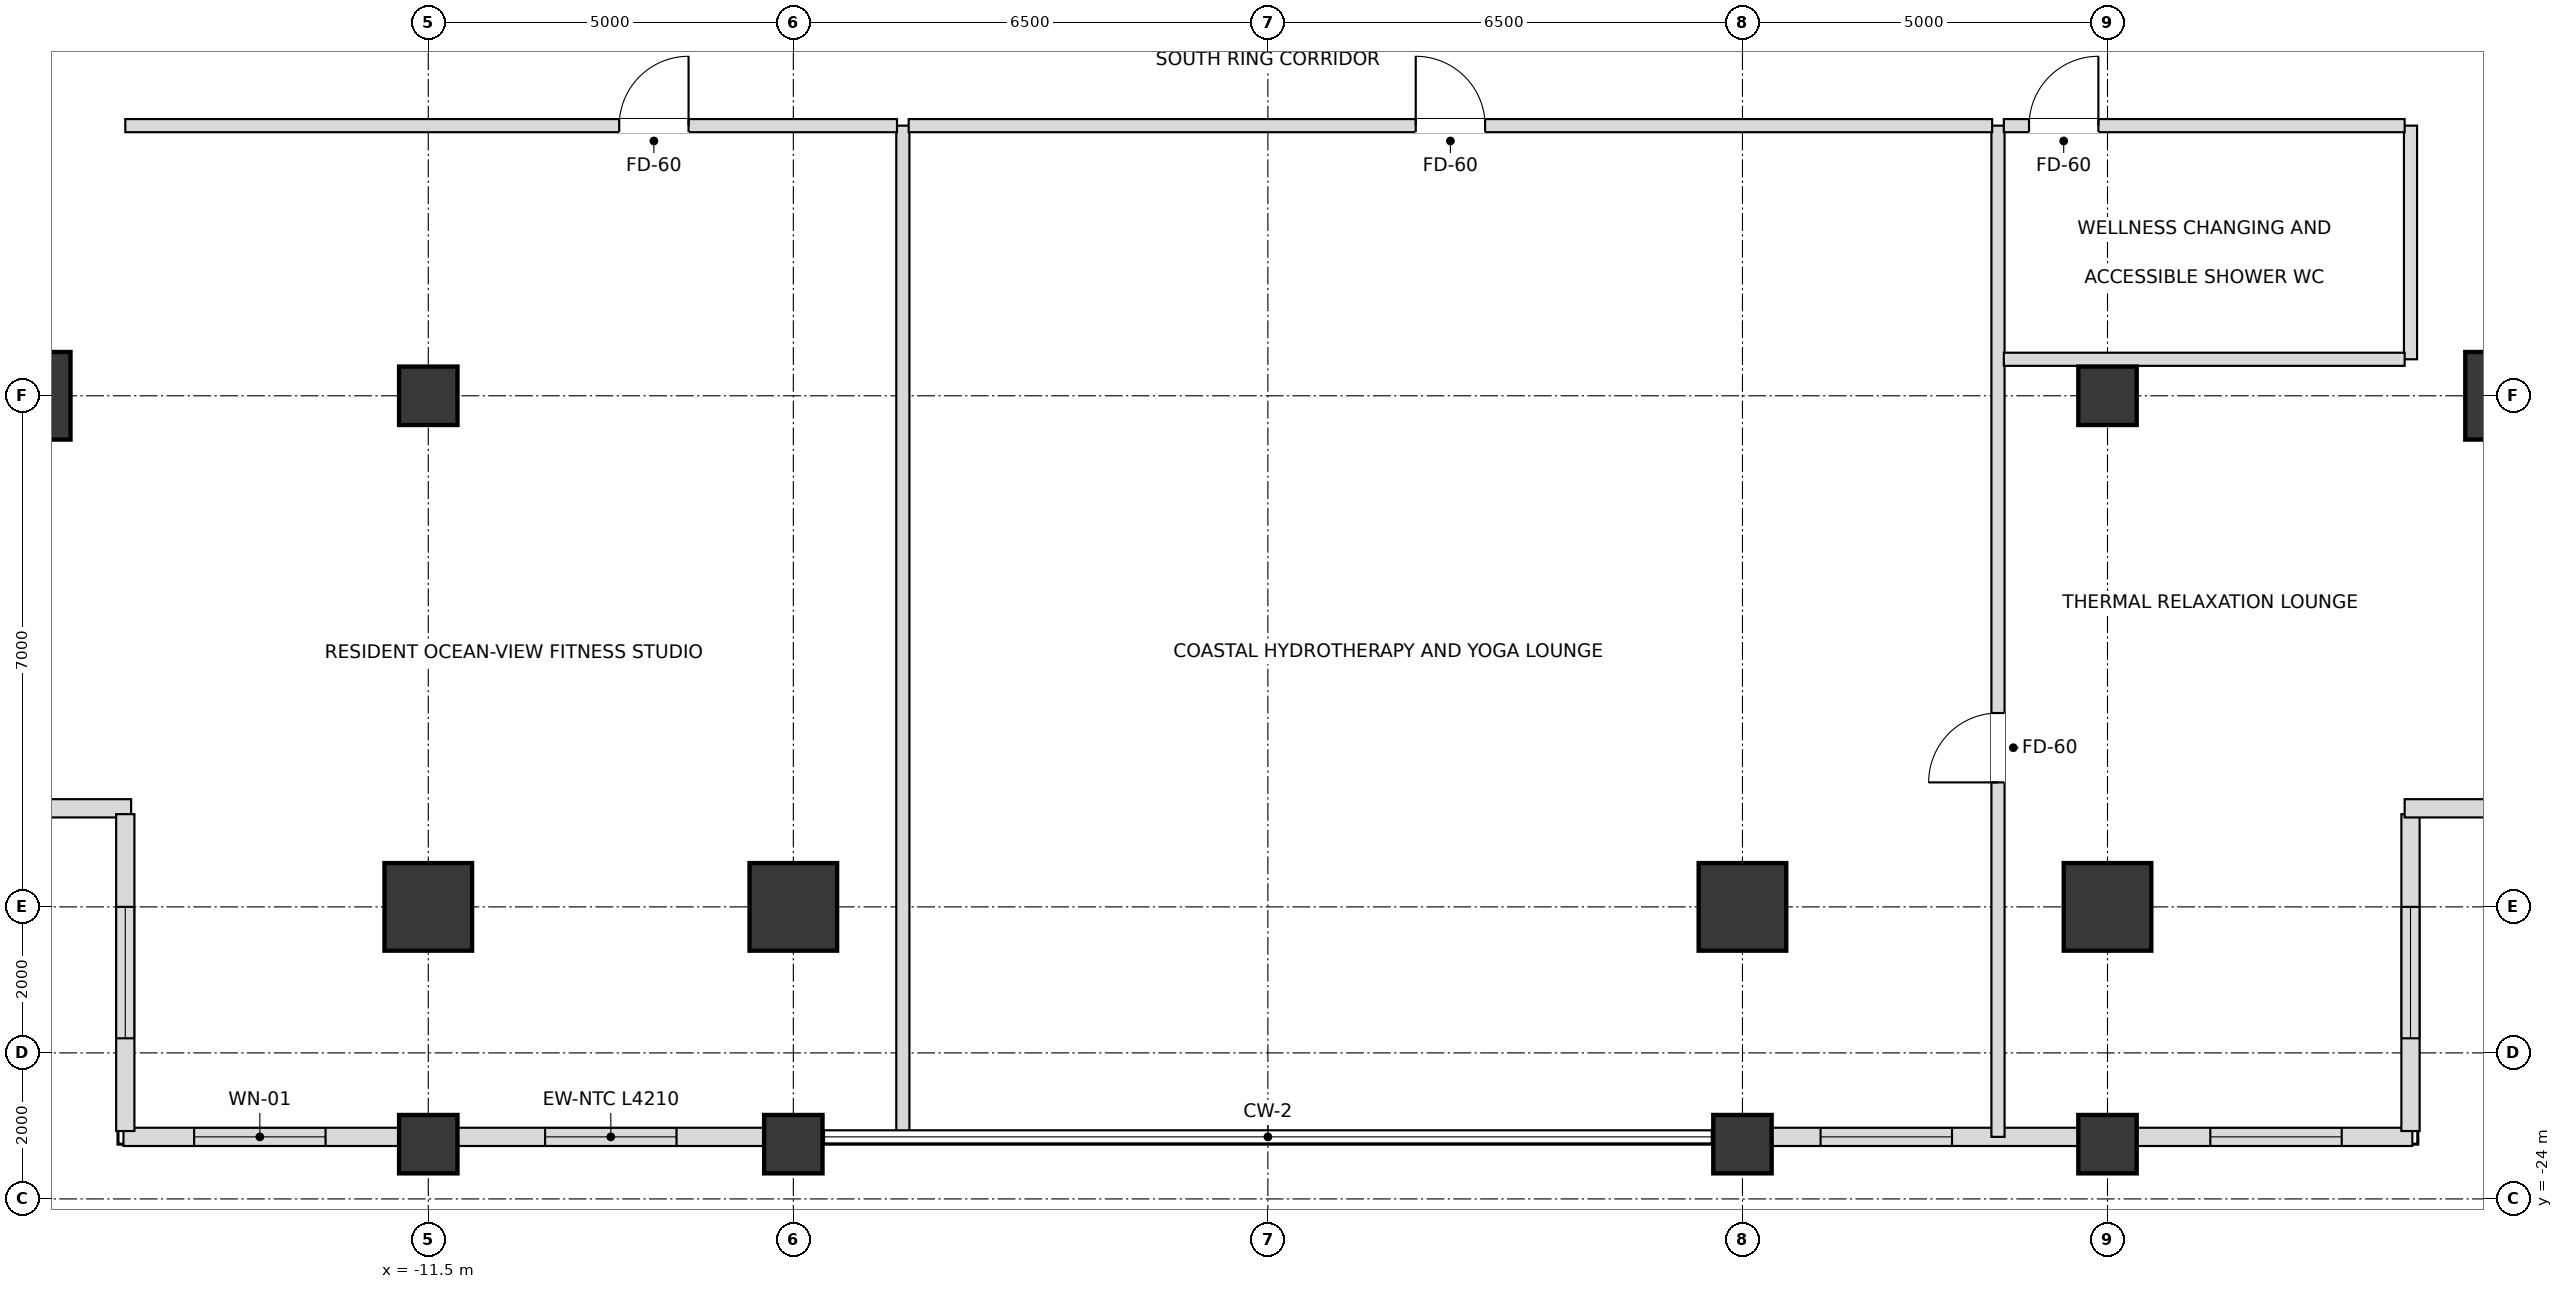
"""IFC4 building model, lengths in metres.
Left out: names, types, materials, properties, quantities, classifications, styles, units other than length and angle.
Written with IfcOpenShell. Run it as: python <this file> out.ifc"""

import sys

from ifc_helpers import new_model, si_unit, direction, frame, frame_2d, origin, origin_2d, place, context, subcontext, project, spatial, rectangle, extrude, element, fill, save


model = new_model("IFC4")
c1 = context("Model", 3, precision=1e-05, world=origin(), true_north=direction((0.0, 1.0)))
c2 = subcontext(c1, "Body", "Model", "MODEL_VIEW")
j1 = project(units=[si_unit("LENGTHUNIT", "METRE"), si_unit("PLANEANGLEUNIT", "RADIAN")], contexts=[c1])
p1 = place(None, origin())
s1 = spatial("IfcSite", under=j1, at=p1, CompositionType="ELEMENT")
p2 = place(p1, origin())
s2 = spatial("IfcBuilding", under=s1, at=p2, CompositionType="ELEMENT")
p3 = place(p2, frame((0.0, 0.0, 106.2)))
s3 = spatial("IfcBuildingStorey", under=s2, at=p3, CompositionType="ELEMENT", Elevation=106.2)
for number, where, z_axis, x_axis in (
    (1, (-11.5, -20.0, 0.0), (0.0, 0.0, 1.0), (1.0, 0.0, 0.0)),
    (2, (-6.5, -20.0, 0.0), (0.0, 0.0, 1.0), (1.0, 0.0, 0.0)),
    (3, (6.5, -20.0, 0.0), (0.0, 0.0, 1.0), (1.0, 0.0, 0.0)),
    (4, (11.5, -20.0, 0.0), (0.0, 0.0, 1.0), (1.0, 0.0, 0.0)),
    (5, (17.0, -13.0, 0.0), (0.0, 0.0, 1.0), (1.0, 0.0, 0.0)),
    (6, (-17.0, -13.0, 0.0), (0.0, 0.0, 1.0), (1.0, 0.0, 0.0)),
):
    element("IfcColumn", number, at=place(p3, frame(where, z_axis=z_axis, x_axis=x_axis)), inside=s3, PredefinedType="USERDEFINED", context=c2, shape_type="SweptSolid", body=[
        extrude(rectangle(XDim=1.2, YDim=1.2, at=origin_2d()), origin(), (0.0, 0.0, 1.0), 3.6),
    ])
for number, where, z_axis, x_axis in (
    (7, (-11.5, -13.0, 0.0), (0.0, 0.0, 1.0), (1.0, 0.0, 0.0)),
    (8, (11.5, -13.0, 0.0), (0.0, 0.0, 1.0), (1.0, 0.0, 0.0)),
    (9, (-11.5, -23.25, 0.0), (0.0, 0.0, 1.0), (1.0, 0.0, 0.0)),
    (10, (-6.5, -23.25, 0.0), (0.0, 0.0, 1.0), (1.0, 0.0, 0.0)),
    (11, (6.5, -23.25, 0.0), (0.0, 0.0, 1.0), (1.0, 0.0, 0.0)),
    (12, (11.5, -23.25, 0.0), (0.0, 0.0, 1.0), (1.0, 0.0, 0.0)),
):
    element("IfcColumn", number, at=place(p3, frame(where, z_axis=z_axis, x_axis=x_axis)), inside=s3, PredefinedType="COLUMN", context=c2, shape_type="SweptSolid", body=[
        extrude(rectangle(XDim=0.8, YDim=0.8, at=origin_2d()), origin(), (0.0, 0.0, 1.0), 3.6),
    ])
p4 = place(p3, frame((-15.675, -23.15, 0.0), z_axis=(0.0, 0.0, 1.0), x_axis=(1.0, 0.0, 0.0)))
e13 = element("IfcWall", 13, at=p4, inside=s3, PredefinedType="SOLIDWALL", context=c2, shape_type="SweptSolid", body=[
    extrude(rectangle(XDim=3.78, YDim=0.25, at=frame_2d((1.89, 0.0))), origin(), (0.0, 0.0, 1.0), 2.736),
])
p5 = place(p4, frame((0.968, 0.0, 0.72)))
e14 = element("IfcOpeningElement", 14, at=p5, cuts=e13, PredefinedType="OPENING", context=c2, shape_type="SweptSolid", body=[
    extrude(rectangle(XDim=1.8, YDim=1.68, at=frame_2d((0.9, 0.84))), frame((0.0, 0.135, 0.0), z_axis=(0.0, -1.0, 0.0), x_axis=(1.0, 0.0, 0.0)), (0.0, 0.0, 1.0), 0.27),
])
p6 = place(p3, frame((-11.105, -23.15, 0.0), z_axis=(0.0, 0.0, 1.0), x_axis=(1.0, 0.0, 0.0)))
e15 = element("IfcWall", 15, at=p6, inside=s3, PredefinedType="SOLIDWALL", context=c2, shape_type="SweptSolid", body=[
    extrude(rectangle(XDim=4.21, YDim=0.25, at=frame_2d((2.105, 0.0))), origin(), (0.0, 0.0, 1.0), 2.736),
])
p7 = place(p6, frame((1.205, 0.0, 0.72)))
e16 = element("IfcOpeningElement", 16, at=p7, cuts=e15, PredefinedType="OPENING", context=c2, shape_type="SweptSolid", body=[
    extrude(rectangle(XDim=1.8, YDim=1.68, at=frame_2d((0.9, 0.84))), frame((0.0, 0.135, 0.0), z_axis=(0.0, -1.0, 0.0), x_axis=(1.0, 0.0, 0.0)), (0.0, 0.0, 1.0), 0.27),
])
p8 = place(p3, frame((6.895, -23.15, 0.0), z_axis=(0.0, 0.0, 1.0), x_axis=(1.0, 0.0, 0.0)))
e17 = element("IfcWall", 17, at=p8, inside=s3, PredefinedType="SOLIDWALL", context=c2, shape_type="SweptSolid", body=[
    extrude(rectangle(XDim=4.21, YDim=0.25, at=frame_2d((2.105, 0.0))), origin(), (0.0, 0.0, 1.0), 2.736),
])
p9 = place(p8, frame((0.675, 0.0, 0.72)))
e18 = element("IfcOpeningElement", 18, at=p9, cuts=e17, PredefinedType="OPENING", context=c2, shape_type="SweptSolid", body=[
    extrude(rectangle(XDim=1.8, YDim=1.68, at=frame_2d((0.9, 0.84))), frame((0.0, 0.135, 0.0), z_axis=(0.0, -1.0, 0.0), x_axis=(1.0, 0.0, 0.0)), (0.0, 0.0, 1.0), 0.27),
])
p10 = place(p3, frame((11.895, -23.15, 0.0), z_axis=(0.0, 0.0, 1.0), x_axis=(1.0, 0.0, 0.0)))
e19 = element("IfcWall", 19, at=p10, inside=s3, PredefinedType="SOLIDWALL", context=c2, shape_type="SweptSolid", body=[
    extrude(rectangle(XDim=3.78, YDim=0.25, at=frame_2d((1.89, 0.0))), origin(), (0.0, 0.0, 1.0), 2.736),
])
p11 = place(p10, frame((1.013, 0.0, 0.72)))
e20 = element("IfcOpeningElement", 20, at=p11, cuts=e19, PredefinedType="OPENING", context=c2, shape_type="SweptSolid", body=[
    extrude(rectangle(XDim=1.8, YDim=1.68, at=frame_2d((0.9, 0.84))), frame((0.0, 0.135, 0.0), z_axis=(0.0, -1.0, 0.0), x_axis=(1.0, 0.0, 0.0)), (0.0, 0.0, 1.0), 0.27),
])
p12 = place(p3, frame((-20.23, -18.65, 0.0), z_axis=(0.0, 0.0, 1.0), x_axis=(1.0, 0.0, 0.0)))
e21 = element("IfcWall", 21, at=p12, inside=s3, PredefinedType="SOLIDWALL", context=c2, shape_type="SweptSolid", body=[
    extrude(rectangle(XDim=4.66, YDim=0.25, at=frame_2d((2.33, 0.0))), origin(), (0.0, 0.0, 1.0), 2.736),
])
p13 = place(p12, frame((1.43, 0.0, 0.72)))
e22 = element("IfcOpeningElement", 22, at=p13, cuts=e21, PredefinedType="OPENING", context=c2, shape_type="SweptSolid", body=[
    extrude(rectangle(XDim=1.8, YDim=1.68, at=frame_2d((0.9, 0.84))), frame((0.0, 0.135, 0.0), z_axis=(0.0, -1.0, 0.0), x_axis=(1.0, 0.0, 0.0)), (0.0, 0.0, 1.0), 0.27),
])
p14 = place(p3, frame((-15.65, -18.73, 0.0), z_axis=(0.0, 0.0, 1.0), x_axis=(0.0, -1.0, 0.0)))
e23 = element("IfcWall", 23, at=p14, inside=s3, PredefinedType="SOLIDWALL", context=c2, shape_type="SweptSolid", body=[
    extrude(rectangle(XDim=4.34, YDim=0.25, at=frame_2d((2.17, 0.0))), origin(), (0.0, 0.0, 1.0), 2.736),
])
p15 = place(p14, frame((1.27, 0.0, 0.72)))
e24 = element("IfcOpeningElement", 24, at=p15, cuts=e23, PredefinedType="OPENING", context=c2, shape_type="SweptSolid", body=[
    extrude(rectangle(XDim=1.8, YDim=1.68, at=frame_2d((0.9, 0.84))), frame((0.0, 0.135, 0.0), z_axis=(0.0, -1.0, 0.0), x_axis=(1.0, 0.0, 0.0)), (0.0, 0.0, 1.0), 0.27),
])
p16 = place(p3, frame((15.65, -23.07, 0.0), z_axis=(0.0, 0.0, 1.0), x_axis=(0.0, 1.0, 0.0)))
e25 = element("IfcWall", 25, at=p16, inside=s3, PredefinedType="SOLIDWALL", context=c2, shape_type="SweptSolid", body=[
    extrude(rectangle(XDim=4.34, YDim=0.25, at=frame_2d((2.17, 0.0))), origin(), (0.0, 0.0, 1.0), 2.736),
])
p17 = place(p16, frame((1.27, 0.0, 0.72)))
e26 = element("IfcOpeningElement", 26, at=p17, cuts=e25, PredefinedType="OPENING", context=c2, shape_type="SweptSolid", body=[
    extrude(rectangle(XDim=1.8, YDim=1.68, at=frame_2d((0.9, 0.84))), frame((0.0, 0.135, 0.0), z_axis=(0.0, -1.0, 0.0), x_axis=(1.0, 0.0, 0.0)), (0.0, 0.0, 1.0), 0.27),
])
p18 = place(p3, frame((15.57, -18.65, 0.0), z_axis=(0.0, 0.0, 1.0), x_axis=(1.0, 0.0, 0.0)))
e27 = element("IfcWall", 27, at=p18, inside=s3, PredefinedType="SOLIDWALL", context=c2, shape_type="SweptSolid", body=[
    extrude(rectangle(XDim=4.66, YDim=0.25, at=frame_2d((2.33, 0.0))), origin(), (0.0, 0.0, 1.0), 2.736),
])
p19 = place(p18, frame((1.43, 0.0, 0.72)))
e28 = element("IfcOpeningElement", 28, at=p19, cuts=e27, PredefinedType="OPENING", context=c2, shape_type="SweptSolid", body=[
    extrude(rectangle(XDim=1.8, YDim=1.68, at=frame_2d((0.9, 0.84))), frame((0.0, 0.135, 0.0), z_axis=(0.0, -1.0, 0.0), x_axis=(1.0, 0.0, 0.0)), (0.0, 0.0, 1.0), 0.27),
])
p20 = place(p3, frame((-5.0, -23.15, 0.0), z_axis=(0.0, 0.0, 1.0), x_axis=(0.0, 1.0, 0.0)))
e29 = element("IfcWall", 29, at=p20, inside=s3, PredefinedType="PARTITIONING", context=c2, shape_type="SweptSolid", body=[
    extrude(rectangle(XDim=13.85, YDim=0.18, at=frame_2d((6.925, 0.0))), origin(), (0.0, 0.0, 1.0), 2.816),
])
p21 = place(p3, frame((10.0, -23.15, 0.0), z_axis=(0.0, 0.0, 1.0), x_axis=(0.0, 1.0, 0.0)))
e30 = element("IfcWall", 30, at=p21, inside=s3, PredefinedType="PARTITIONING", context=c2, shape_type="SweptSolid", body=[
    extrude(rectangle(XDim=13.85, YDim=0.18, at=frame_2d((6.925, 0.0))), origin(), (0.0, 0.0, 1.0), 2.816),
])
p22 = place(p21, frame((4.855, 0.0, 0.0)))
e31 = element("IfcOpeningElement", 31, at=p22, cuts=e30, PredefinedType="OPENING", context=c2, shape_type="SweptSolid", body=[
    extrude(rectangle(XDim=0.95, YDim=2.15, at=frame_2d((0.475, 1.075))), frame((0.0, 0.1, 0.0), z_axis=(0.0, -1.0, 0.0), x_axis=(1.0, 0.0, 0.0)), (0.0, 0.0, 1.0), 0.2),
])
p23 = place(p3, frame((15.65, -12.5, 0.0), z_axis=(0.0, 0.0, 1.0), x_axis=(0.0, 1.0, 0.0)))
e32 = element("IfcWall", 32, at=p23, inside=s3, PredefinedType="PARTITIONING", context=c2, shape_type="SweptSolid", body=[
    extrude(rectangle(XDim=3.2, YDim=0.18, at=frame_2d((1.6, 0.0))), origin(), (0.0, 0.0, 1.0), 3.38),
])
p24 = place(p3, frame((10.08, -12.5, 0.0), z_axis=(0.0, 0.0, 1.0), x_axis=(1.0, 0.0, 0.0)))
e33 = element("IfcWall", 33, at=p24, inside=s3, PredefinedType="PARTITIONING", context=c2, shape_type="SweptSolid", body=[
    extrude(rectangle(XDim=5.49, YDim=0.18, at=frame_2d((2.745, 0.0))), origin(), (0.0, 0.0, 1.0), 3.38),
])
p25 = place(p3, frame((-15.65, -9.3, 0.0), z_axis=(0.0, 0.0, 1.0), x_axis=(1.0, 0.0, 0.0)))
e34 = element("IfcWall", 34, at=p25, inside=s3, PredefinedType="PARTITIONING", context=c2, shape_type="SweptSolid", body=[
    extrude(rectangle(XDim=10.57, YDim=0.18, at=frame_2d((5.285, 0.0))), origin(), (0.0, 0.0, 1.0), 2.816),
])
p26 = place(p25, frame((6.765, 0.0, 0.0)))
e35 = element("IfcOpeningElement", 35, at=p26, cuts=e34, PredefinedType="OPENING", context=c2, shape_type="SweptSolid", body=[
    extrude(rectangle(XDim=0.95, YDim=2.15, at=frame_2d((0.475, 1.075))), frame((0.0, 0.1, 0.0), z_axis=(0.0, -1.0, 0.0), x_axis=(1.0, 0.0, 0.0)), (0.0, 0.0, 1.0), 0.2),
])
p27 = place(p3, frame((-4.92, -9.3, 0.0), z_axis=(0.0, 0.0, 1.0), x_axis=(1.0, 0.0, 0.0)))
e36 = element("IfcWall", 36, at=p27, inside=s3, PredefinedType="PARTITIONING", context=c2, shape_type="SweptSolid", body=[
    extrude(rectangle(XDim=14.84, YDim=0.18, at=frame_2d((7.42, 0.0))), origin(), (0.0, 0.0, 1.0), 2.816),
])
p28 = place(p27, frame((6.945, 0.0, 0.0)))
e37 = element("IfcOpeningElement", 37, at=p28, cuts=e36, PredefinedType="OPENING", context=c2, shape_type="SweptSolid", body=[
    extrude(rectangle(XDim=0.95, YDim=2.15, at=frame_2d((0.475, 1.075))), frame((0.0, 0.1, 0.0), z_axis=(0.0, -1.0, 0.0), x_axis=(1.0, 0.0, 0.0)), (0.0, 0.0, 1.0), 0.2),
])
p29 = place(p3, frame((10.08, -9.3, 0.0), z_axis=(0.0, 0.0, 1.0), x_axis=(1.0, 0.0, 0.0)))
e38 = element("IfcWall", 38, at=p29, inside=s3, PredefinedType="PARTITIONING", context=c2, shape_type="SweptSolid", body=[
    extrude(rectangle(XDim=5.49, YDim=0.18, at=frame_2d((2.745, 0.0))), origin(), (0.0, 0.0, 1.0), 3.38),
])
p30 = place(p29, frame((0.345, 0.0, 0.0)))
e39 = element("IfcOpeningElement", 39, at=p30, cuts=e38, PredefinedType="OPENING", context=c2, shape_type="SweptSolid", body=[
    extrude(rectangle(XDim=0.95, YDim=2.15, at=frame_2d((0.475, 1.075))), frame((0.0, 0.1, 0.0), z_axis=(0.0, -1.0, 0.0), x_axis=(1.0, 0.0, 0.0)), (0.0, 0.0, 1.0), 0.2),
])
p31 = place(p5, origin())
e40 = element("IfcWindow", 40, at=p31, inside=s3, PartitioningType="SINGLE_PANEL", PredefinedType="WINDOW", context=c2, shape_type="SweptSolid", body=[
    extrude(rectangle(XDim=1.8, YDim=1.68, at=frame_2d((0.9, 0.84))), frame((0.0, 0.03, 0.0), z_axis=(0.0, -1.0, 0.0), x_axis=(1.0, 0.0, 0.0)), (0.0, 0.0, 1.0), 0.06),
])
fill(e14, e40)
p32 = place(p7, origin())
e41 = element("IfcWindow", 41, at=p32, inside=s3, PartitioningType="SINGLE_PANEL", PredefinedType="WINDOW", context=c2, shape_type="SweptSolid", body=[
    extrude(rectangle(XDim=1.8, YDim=1.68, at=frame_2d((0.9, 0.84))), frame((0.0, 0.03, 0.0), z_axis=(0.0, -1.0, 0.0), x_axis=(1.0, 0.0, 0.0)), (0.0, 0.0, 1.0), 0.06),
])
fill(e16, e41)
p33 = place(p9, origin())
e42 = element("IfcWindow", 42, at=p33, inside=s3, PartitioningType="SINGLE_PANEL", PredefinedType="WINDOW", context=c2, shape_type="SweptSolid", body=[
    extrude(rectangle(XDim=1.8, YDim=1.68, at=frame_2d((0.9, 0.84))), frame((0.0, 0.03, 0.0), z_axis=(0.0, -1.0, 0.0), x_axis=(1.0, 0.0, 0.0)), (0.0, 0.0, 1.0), 0.06),
])
fill(e18, e42)
p34 = place(p11, origin())
e43 = element("IfcWindow", 43, at=p34, inside=s3, PartitioningType="SINGLE_PANEL", PredefinedType="WINDOW", context=c2, shape_type="SweptSolid", body=[
    extrude(rectangle(XDim=1.8, YDim=1.68, at=frame_2d((0.9, 0.84))), frame((0.0, 0.03, 0.0), z_axis=(0.0, -1.0, 0.0), x_axis=(1.0, 0.0, 0.0)), (0.0, 0.0, 1.0), 0.06),
])
fill(e20, e43)
p35 = place(p15, origin())
e44 = element("IfcWindow", 44, at=p35, inside=s3, PartitioningType="SINGLE_PANEL", PredefinedType="WINDOW", context=c2, shape_type="SweptSolid", body=[
    extrude(rectangle(XDim=1.8, YDim=1.68, at=frame_2d((0.9, 0.84))), frame((0.0, 0.03, 0.0), z_axis=(0.0, -1.0, 0.0), x_axis=(1.0, 0.0, 0.0)), (0.0, 0.0, 1.0), 0.06),
])
fill(e24, e44)
p36 = place(p17, origin())
e45 = element("IfcWindow", 45, at=p36, inside=s3, PartitioningType="SINGLE_PANEL", PredefinedType="WINDOW", context=c2, shape_type="SweptSolid", body=[
    extrude(rectangle(XDim=1.8, YDim=1.68, at=frame_2d((0.9, 0.84))), frame((0.0, 0.03, 0.0), z_axis=(0.0, -1.0, 0.0), x_axis=(1.0, 0.0, 0.0)), (0.0, 0.0, 1.0), 0.06),
])
fill(e26, e45)
p37 = place(p30, origin())
e46 = element("IfcDoor", 46, at=p37, inside=s3, OperationType="SINGLE_SWING_RIGHT", PredefinedType="DOOR", context=c2, shape_type="SweptSolid", body=[
    extrude(rectangle(XDim=0.95, YDim=2.15, at=frame_2d((0.475, 1.075))), frame((0.0, 0.025, 0.0), z_axis=(0.0, -1.0, 0.0), x_axis=(1.0, 0.0, 0.0)), (0.0, 0.0, 1.0), 0.05),
])
fill(e39, e46)
p38 = place(p22, origin())
e47 = element("IfcDoor", 47, at=p38, inside=s3, OperationType="SINGLE_SWING_LEFT", PredefinedType="DOOR", context=c2, shape_type="SweptSolid", body=[
    extrude(rectangle(XDim=0.95, YDim=2.15, at=frame_2d((0.475, 1.075))), frame((0.0, 0.025, 0.0), z_axis=(0.0, -1.0, 0.0), x_axis=(1.0, 0.0, 0.0)), (0.0, 0.0, 1.0), 0.05),
])
fill(e31, e47)
p39 = place(p26, origin())
e48 = element("IfcDoor", 48, at=p39, inside=s3, OperationType="SINGLE_SWING_RIGHT", PredefinedType="DOOR", context=c2, shape_type="SweptSolid", body=[
    extrude(rectangle(XDim=0.95, YDim=2.15, at=frame_2d((0.475, 1.075))), frame((0.0, 0.025, 0.0), z_axis=(0.0, -1.0, 0.0), x_axis=(1.0, 0.0, 0.0)), (0.0, 0.0, 1.0), 0.05),
])
fill(e35, e48)
p40 = place(p28, origin())
e49 = element("IfcDoor", 49, at=p40, inside=s3, OperationType="SINGLE_SWING_LEFT", PredefinedType="DOOR", context=c2, shape_type="SweptSolid", body=[
    extrude(rectangle(XDim=0.95, YDim=2.15, at=frame_2d((0.475, 1.075))), frame((0.0, 0.025, 0.0), z_axis=(0.0, -1.0, 0.0), x_axis=(1.0, 0.0, 0.0)), (0.0, 0.0, 1.0), 0.05),
])
fill(e37, e49)
save(model, sys.argv[1])
